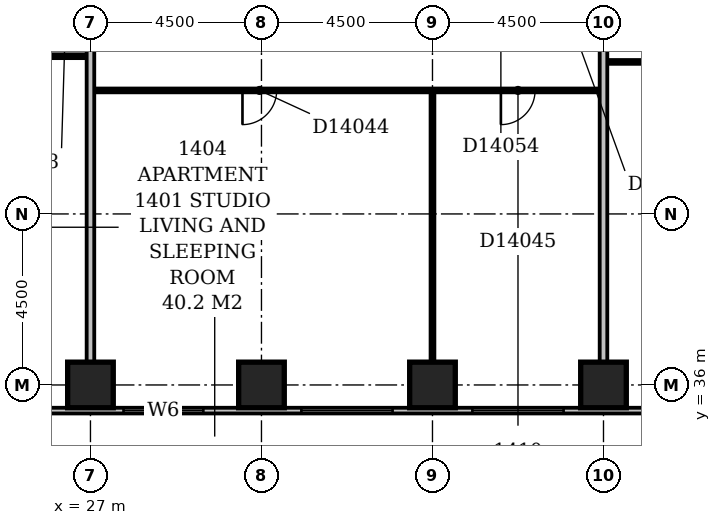
"""IFC4 building model, lengths in metres.
Left out: names, types, materials, properties, quantities, classifications, styles, units other than length and angle.
Written with IfcOpenShell. Run it as: python <this file> out.ifc"""

import sys

from ifc_helpers import new_model, si_unit, direction, frame, frame_2d, origin, origin_2d, place, context, subcontext, project, spatial, rectangle, extrude, element, fill, save


model = new_model("IFC4")
c1 = context("Model", 3, precision=1e-05, world=origin(), true_north=direction((0.0, 1.0)))
c2 = subcontext(c1, "Body", "Model", "MODEL_VIEW")
j1 = project(units=[si_unit("LENGTHUNIT", "METRE"), si_unit("PLANEANGLEUNIT", "RADIAN")], contexts=[c1])
p1 = place(None, origin())
s1 = spatial("IfcSite", under=j1, at=p1, CompositionType="ELEMENT")
p2 = place(p1, origin())
s2 = spatial("IfcBuilding", under=s1, at=p2, CompositionType="ELEMENT")
p3 = place(p2, frame((0.0, 0.0, 61.4)))
s3 = spatial("IfcBuildingStorey", under=s2, at=p3, CompositionType="ELEMENT", Elevation=61.4)
for number, where, z_axis, x_axis in (
    (1, (27.0, 36.0, -0.3), (0.0, 0.0, 1.0), (1.0, 0.0, 0.0)),
    (2, (31.5, 36.0, -0.3), (0.0, 0.0, 1.0), (1.0, 0.0, 0.0)),
    (3, (36.0, 36.0, -0.3), (0.0, 0.0, 1.0), (1.0, 0.0, 0.0)),
    (4, (40.5, 36.0, -0.3), (0.0, 0.0, 1.0), (1.0, 0.0, 0.0)),
):
    element("IfcColumn", number, at=place(p3, frame(where, z_axis=z_axis, x_axis=x_axis)), inside=s3, PredefinedType="COLUMN", context=c2, shape_type="SweptSolid", body=[
        extrude(rectangle(XDim=1.2, YDim=1.2, at=origin_2d()), origin(), (0.0, 0.0, 1.0), 3.6),
    ])
p4 = place(p3, frame((23.1, 35.325, 0.0), z_axis=(0.0, 0.0, 1.0), x_axis=(1.0, 0.0, 0.0)))
e5 = element("IfcWall", 5, at=p4, inside=s3, PredefinedType="STANDARD", context=c2, shape_type="SweptSolid", body=[
    extrude(rectangle(XDim=45.15, YDim=0.15, at=frame_2d((22.575, 0.0))), origin(), (0.0, 0.0, 1.0), 2.7),
])
p5 = place(p4, frame((0.45, 0.0, 0.6)))
e6 = element("IfcOpeningElement", 6, at=p5, cuts=e5, PredefinedType="OPENING", context=c2, shape_type="SweptSolid", body=[
    extrude(rectangle(XDim=2.4, YDim=1.8, at=frame_2d((1.2, 0.9))), frame((0.0, 0.087, 0.0), z_axis=(0.0, -1.0, 0.0), x_axis=(1.0, 0.0, 0.0)), (0.0, 0.0, 1.0), 0.174),
])
p6 = place(p4, frame((4.77, 0.0, 0.6)))
e7 = element("IfcOpeningElement", 7, at=p6, cuts=e5, PredefinedType="OPENING", context=c2, shape_type="SweptSolid", body=[
    extrude(rectangle(XDim=2.1, YDim=1.8, at=frame_2d((1.05, 0.9))), frame((0.0, 0.087, 0.0), z_axis=(0.0, -1.0, 0.0), x_axis=(1.0, 0.0, 0.0)), (0.0, 0.0, 1.0), 0.174),
])
p7 = place(p4, frame((9.45, 0.0, 0.6)))
e8 = element("IfcOpeningElement", 8, at=p7, cuts=e5, PredefinedType="OPENING", context=c2, shape_type="SweptSolid", body=[
    extrude(rectangle(XDim=2.4, YDim=1.8, at=frame_2d((1.2, 0.9))), frame((0.0, 0.087, 0.0), z_axis=(0.0, -1.0, 0.0), x_axis=(1.0, 0.0, 0.0)), (0.0, 0.0, 1.0), 0.174),
])
p8 = place(p4, frame((13.95, 0.0, 0.6)))
e9 = element("IfcOpeningElement", 9, at=p8, cuts=e5, PredefinedType="OPENING", context=c2, shape_type="SweptSolid", body=[
    extrude(rectangle(XDim=2.4, YDim=1.8, at=frame_2d((1.2, 0.9))), frame((0.0, 0.087, 0.0), z_axis=(0.0, -1.0, 0.0), x_axis=(1.0, 0.0, 0.0)), (0.0, 0.0, 1.0), 0.174),
])
p9 = place(p4, frame((19.47, 0.0, 0.6)))
e10 = element("IfcOpeningElement", 10, at=p9, cuts=e5, PredefinedType="OPENING", context=c2, shape_type="SweptSolid", body=[
    extrude(rectangle(XDim=1.5, YDim=1.8, at=frame_2d((0.75, 0.9))), frame((0.0, 0.087, 0.0), z_axis=(0.0, -1.0, 0.0), x_axis=(1.0, 0.0, 0.0)), (0.0, 0.0, 1.0), 0.174),
])
p10 = place(p4, frame((22.95, 0.0, 0.6)))
e11 = element("IfcOpeningElement", 11, at=p10, cuts=e5, PredefinedType="OPENING", context=c2, shape_type="SweptSolid", body=[
    extrude(rectangle(XDim=2.4, YDim=1.8, at=frame_2d((1.2, 0.9))), frame((0.0, 0.087, 0.0), z_axis=(0.0, -1.0, 0.0), x_axis=(1.0, 0.0, 0.0)), (0.0, 0.0, 1.0), 0.174),
])
p11 = place(p4, frame((27.45, 0.0, 0.6)))
e12 = element("IfcOpeningElement", 12, at=p11, cuts=e5, PredefinedType="OPENING", context=c2, shape_type="SweptSolid", body=[
    extrude(rectangle(XDim=2.4, YDim=1.8, at=frame_2d((1.2, 0.9))), frame((0.0, 0.087, 0.0), z_axis=(0.0, -1.0, 0.0), x_axis=(1.0, 0.0, 0.0)), (0.0, 0.0, 1.0), 0.174),
])
p12 = place(p4, frame((31.95, 0.0, 0.6)))
e13 = element("IfcOpeningElement", 13, at=p12, cuts=e5, PredefinedType="OPENING", context=c2, shape_type="SweptSolid", body=[
    extrude(rectangle(XDim=2.4, YDim=1.8, at=frame_2d((1.2, 0.9))), frame((0.0, 0.087, 0.0), z_axis=(0.0, -1.0, 0.0), x_axis=(1.0, 0.0, 0.0)), (0.0, 0.0, 1.0), 0.174),
])
p13 = place(p4, frame((38.403, 0.0, 0.6)))
e14 = element("IfcOpeningElement", 14, at=p13, cuts=e5, PredefinedType="OPENING", context=c2, shape_type="SweptSolid", body=[
    extrude(rectangle(XDim=0.6, YDim=1.8, at=frame_2d((0.3, 0.9))), frame((0.0, 0.087, 0.0), z_axis=(0.0, -1.0, 0.0), x_axis=(1.0, 0.0, 0.0)), (0.0, 0.0, 1.0), 0.174),
])
p14 = place(p4, frame((40.95, 0.0, 0.6)))
e15 = element("IfcOpeningElement", 15, at=p14, cuts=e5, PredefinedType="OPENING", context=c2, shape_type="SweptSolid", body=[
    extrude(rectangle(XDim=2.4, YDim=1.8, at=frame_2d((1.2, 0.9))), frame((0.0, 0.087, 0.0), z_axis=(0.0, -1.0, 0.0), x_axis=(1.0, 0.0, 0.0)), (0.0, 0.0, 1.0), 0.174),
])
p15 = place(p3, frame((27.0, 36.6, 0.0), z_axis=(0.0, 0.0, 1.0), x_axis=(0.0, 1.0, 0.0)))
e16 = element("IfcWall", 16, at=p15, inside=s3, PredefinedType="PARTITIONING", context=c2, shape_type="SweptSolid", body=[
    extrude(rectangle(XDim=12.8, YDim=0.2, at=frame_2d((6.4, 0.0))), origin(), (0.0, 0.0, 1.0), 2.6),
])
p16 = place(p3, frame((36.0, 36.6, 0.0), z_axis=(0.0, 0.0, 1.0), x_axis=(0.0, 1.0, 0.0)))
e17 = element("IfcWall", 17, at=p16, inside=s3, PredefinedType="PARTITIONING", context=c2, shape_type="SweptSolid", body=[
    extrude(rectangle(XDim=7.1, YDim=0.1, at=frame_2d((3.55, 0.0))), origin(), (0.0, 0.0, 1.0), 2.4),
])
p17 = place(p3, frame((40.5, 36.6, 0.0), z_axis=(0.0, 0.0, 1.0), x_axis=(0.0, 1.0, 0.0)))
e18 = element("IfcWall", 18, at=p17, inside=s3, PredefinedType="PARTITIONING", context=c2, shape_type="SweptSolid", body=[
    extrude(rectangle(XDim=12.8, YDim=0.2, at=frame_2d((6.4, 0.0))), origin(), (0.0, 0.0, 1.0), 3.3),
])
p18 = place(p3, frame((27.1, 43.75, 0.0), z_axis=(0.0, 0.0, 1.0), x_axis=(1.0, 0.0, 0.0)))
e19 = element("IfcWall", 19, at=p18, inside=s3, PredefinedType="PARTITIONING", context=c2, shape_type="SweptSolid", body=[
    extrude(rectangle(XDim=13.3, YDim=0.1, at=frame_2d((6.65, 0.0))), origin(), (0.0, 0.0, 1.0), 3.3),
])
p19 = place(p18, frame((3.9, 0.0, 0.0)))
e20 = element("IfcOpeningElement", 20, at=p19, cuts=e19, PredefinedType="OPENING", context=c2, shape_type="SweptSolid", body=[
    extrude(rectangle(XDim=0.9, YDim=2.1, at=frame_2d((0.45, 1.05))), frame((0.0, 0.062, 0.0), z_axis=(0.0, -1.0, 0.0), x_axis=(1.0, 0.0, 0.0)), (0.0, 0.0, 1.0), 0.124),
])
p20 = place(p18, frame((10.7, 0.0, 0.0)))
e21 = element("IfcOpeningElement", 21, at=p20, cuts=e19, PredefinedType="OPENING", context=c2, shape_type="SweptSolid", body=[
    extrude(rectangle(XDim=0.9, YDim=2.1, at=frame_2d((0.45, 1.05))), frame((0.0, 0.062, 0.0), z_axis=(0.0, -1.0, 0.0), x_axis=(1.0, 0.0, 0.0)), (0.0, 0.0, 1.0), 0.124),
])
p21 = place(p3, frame((40.6, 44.5, 0.0), z_axis=(0.0, 0.0, 1.0), x_axis=(1.0, 0.0, 0.0)))
e22 = element("IfcWall", 22, at=p21, inside=s3, PredefinedType="PARTITIONING", context=c2, shape_type="SweptSolid", body=[
    extrude(rectangle(XDim=13.3, YDim=0.1, at=frame_2d((6.65, 0.0))), origin(), (0.0, 0.0, 1.0), 3.3),
])
p22 = place(p21, frame((1.7, 0.0, 0.0)))
e23 = element("IfcOpeningElement", 23, at=p22, cuts=e22, PredefinedType="OPENING", context=c2, shape_type="SweptSolid", body=[
    extrude(rectangle(XDim=0.9, YDim=2.1, at=frame_2d((0.45, 1.05))), frame((0.0, 0.062, 0.0), z_axis=(0.0, -1.0, 0.0), x_axis=(1.0, 0.0, 0.0)), (0.0, 0.0, 1.0), 0.124),
])
p23 = place(p21, frame((6.2, 0.0, 0.0)))
e24 = element("IfcOpeningElement", 24, at=p23, cuts=e22, PredefinedType="OPENING", context=c2, shape_type="SweptSolid", body=[
    extrude(rectangle(XDim=0.9, YDim=2.1, at=frame_2d((0.45, 1.05))), frame((0.0, 0.062, 0.0), z_axis=(0.0, -1.0, 0.0), x_axis=(1.0, 0.0, 0.0)), (0.0, 0.0, 1.0), 0.124),
])
p24 = place(p21, frame((10.7, 0.0, 0.0)))
e25 = element("IfcOpeningElement", 25, at=p24, cuts=e22, PredefinedType="OPENING", context=c2, shape_type="SweptSolid", body=[
    extrude(rectangle(XDim=0.9, YDim=2.1, at=frame_2d((0.45, 1.05))), frame((0.0, 0.062, 0.0), z_axis=(0.0, -1.0, 0.0), x_axis=(1.0, 0.0, 0.0)), (0.0, 0.0, 1.0), 0.124),
])
p25 = place(p3, frame((22.6, 44.65, 0.0), z_axis=(0.0, 0.0, 1.0), x_axis=(1.0, 0.0, 0.0)))
e26 = element("IfcWall", 26, at=p25, inside=s3, PredefinedType="PARTITIONING", context=c2, shape_type="SweptSolid", body=[
    extrude(rectangle(XDim=4.3, YDim=0.1, at=frame_2d((2.15, 0.0))), origin(), (0.0, 0.0, 1.0), 3.3),
])
p26 = place(p25, frame((1.7, 0.0, 0.0)))
e27 = element("IfcOpeningElement", 27, at=p26, cuts=e26, PredefinedType="OPENING", context=c2, shape_type="SweptSolid", body=[
    extrude(rectangle(XDim=0.9, YDim=2.1, at=frame_2d((0.45, 1.05))), frame((0.0, 0.062, 0.0), z_axis=(0.0, -1.0, 0.0), x_axis=(1.0, 0.0, 0.0)), (0.0, 0.0, 1.0), 0.124),
])
p27 = place(p6, origin())
e28 = element("IfcWindow", 28, at=p27, inside=s3, PartitioningType="SINGLE_PANEL", PredefinedType="WINDOW", context=c2, shape_type="SweptSolid", body=[
    extrude(rectangle(XDim=2.1, YDim=1.8, at=frame_2d((1.05, 0.9))), frame((0.0, 0.03, 0.0), z_axis=(0.0, -1.0, 0.0), x_axis=(1.0, 0.0, 0.0)), (0.0, 0.0, 1.0), 0.06),
])
fill(e7, e28)
p28 = place(p7, origin())
e29 = element("IfcWindow", 29, at=p28, inside=s3, PartitioningType="SINGLE_PANEL", PredefinedType="WINDOW", context=c2, shape_type="SweptSolid", body=[
    extrude(rectangle(XDim=2.4, YDim=1.8, at=frame_2d((1.2, 0.9))), frame((0.0, 0.03, 0.0), z_axis=(0.0, -1.0, 0.0), x_axis=(1.0, 0.0, 0.0)), (0.0, 0.0, 1.0), 0.06),
])
fill(e8, e29)
p29 = place(p8, origin())
e30 = element("IfcWindow", 30, at=p29, inside=s3, PartitioningType="SINGLE_PANEL", PredefinedType="WINDOW", context=c2, shape_type="SweptSolid", body=[
    extrude(rectangle(XDim=2.4, YDim=1.8, at=frame_2d((1.2, 0.9))), frame((0.0, 0.03, 0.0), z_axis=(0.0, -1.0, 0.0), x_axis=(1.0, 0.0, 0.0)), (0.0, 0.0, 1.0), 0.06),
])
fill(e9, e30)
p30 = place(p19, frame((0.9, 0.0, 0.0), z_axis=(0.0, 0.0, 1.0), x_axis=(-1.0, 0.0, 0.0)))
e31 = element("IfcDoor", 31, at=p30, inside=s3, OperationType="SINGLE_SWING_RIGHT", PredefinedType="DOOR", context=c2, shape_type="SweptSolid", body=[
    extrude(rectangle(XDim=0.9, YDim=2.1, at=frame_2d((0.45, 1.05))), frame((0.0, 0.025, 0.0), z_axis=(0.0, -1.0, 0.0), x_axis=(1.0, 0.0, 0.0)), (0.0, 0.0, 1.0), 0.05),
])
fill(e20, e31)
p31 = place(p20, frame((0.9, 0.0, 0.0), z_axis=(0.0, 0.0, 1.0), x_axis=(-1.0, 0.0, 0.0)))
e32 = element("IfcDoor", 32, at=p31, inside=s3, OperationType="SINGLE_SWING_RIGHT", PredefinedType="DOOR", context=c2, shape_type="SweptSolid", body=[
    extrude(rectangle(XDim=0.9, YDim=2.1, at=frame_2d((0.45, 1.05))), frame((0.0, 0.025, 0.0), z_axis=(0.0, -1.0, 0.0), x_axis=(1.0, 0.0, 0.0)), (0.0, 0.0, 1.0), 0.05),
])
fill(e21, e32)
save(model, sys.argv[1])
